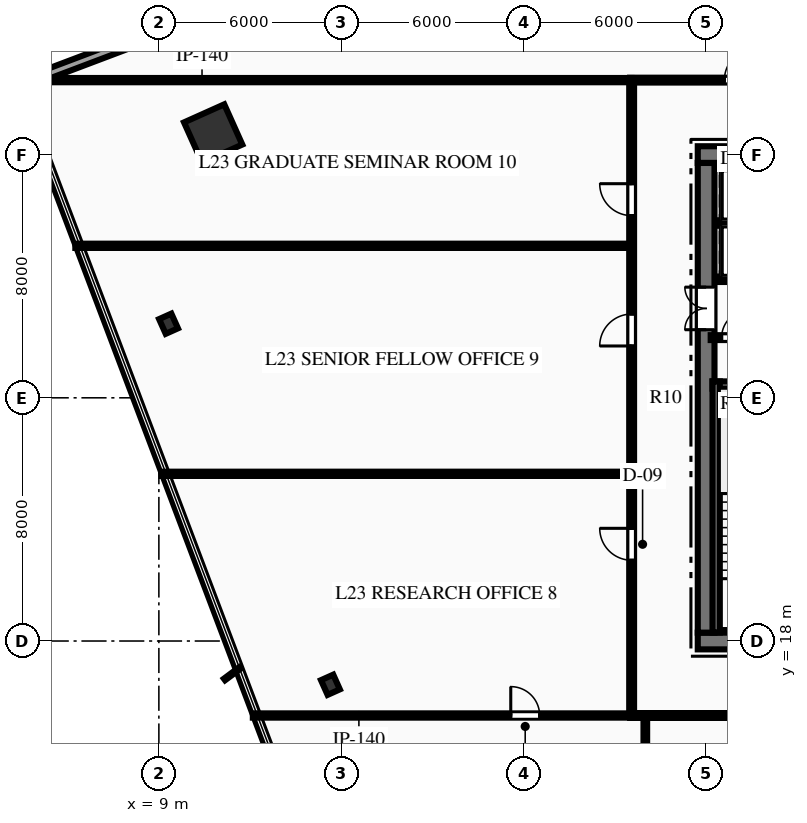
"""IFC4 building model, lengths in metres.
Left out: names, types, materials, properties, quantities, classifications, styles, units other than length and angle.
Written with IfcOpenShell. Run it as: python <this file> out.ifc"""

import sys

from ifc_helpers import new_model, si_unit, direction, frame, frame_2d, origin, origin_2d, place, context, subcontext, project, spatial, rectangle, hollow_rectangle, i_section, extrude, element, fill, save


model = new_model("IFC4")
c1 = context("Model", 3, precision=1e-05, world=origin(), true_north=direction((0.0, 1.0)))
c2 = subcontext(c1, "Body", "Model", "MODEL_VIEW")
j1 = project(units=[si_unit("LENGTHUNIT", "METRE"), si_unit("PLANEANGLEUNIT", "RADIAN")], contexts=[c1])
p1 = place(None, origin())
s1 = spatial("IfcSite", under=j1, at=p1, CompositionType="ELEMENT")
p2 = place(p1, origin())
s2 = spatial("IfcBuilding", under=s1, at=p2, CompositionType="ELEMENT")
p3 = place(p2, frame((0.0, 0.0, 97.95)))
s3 = spatial("IfcBuildingStorey", under=s2, at=p3, CompositionType="ELEMENT", Elevation=97.95)
p4 = place(p3, frame((26.725, 18.0, 0.0), z_axis=(0.0, 0.0, 1.0), x_axis=(1.0, 0.0, 0.0)))
e1 = element("IfcWall", 1, at=p4, inside=s3, PredefinedType="SHEAR", context=c2, shape_type="SweptSolid", body=[
    extrude(rectangle(XDim=18.55, YDim=0.55, at=frame_2d((9.275, 0.0))), origin(), (0.0, 0.0, 1.0), 3.75),
])
p5 = place(p4, frame((7.375, 0.0, 0.0)))
e2 = element("IfcOpeningElement", 2, at=p5, cuts=e1, PredefinedType="OPENING", context=c2, shape_type="SweptSolid", body=[
    extrude(rectangle(XDim=1.1, YDim=2.15, at=frame_2d((0.55, 1.075))), frame((0.0, 0.285, 0.0), z_axis=(0.0, -1.0, 0.0), x_axis=(1.0, 0.0, 0.0)), (0.0, 0.0, 1.0), 0.57),
])
p6 = place(p4, frame((10.075, 0.0, 0.0)))
e3 = element("IfcOpeningElement", 3, at=p6, cuts=e1, PredefinedType="OPENING", context=c2, shape_type="SweptSolid", body=[
    extrude(rectangle(XDim=1.1, YDim=2.15, at=frame_2d((0.55, 1.075))), frame((0.0, 0.285, 0.0), z_axis=(0.0, -1.0, 0.0), x_axis=(1.0, 0.0, 0.0)), (0.0, 0.0, 1.0), 0.57),
])
p7 = place(p3, frame((26.725, 34.0, 0.0), z_axis=(0.0, 0.0, 1.0), x_axis=(1.0, 0.0, 0.0)))
e4 = element("IfcWall", 4, at=p7, inside=s3, PredefinedType="SHEAR", context=c2, shape_type="SweptSolid", body=[
    extrude(rectangle(XDim=18.55, YDim=0.55, at=frame_2d((9.275, 0.0))), origin(), (0.0, 0.0, 1.0), 3.75),
])
p8 = place(p7, frame((1.24, 0.0, 0.0)))
e5 = element("IfcOpeningElement", 5, at=p8, cuts=e4, PredefinedType="OPENING", context=c2, shape_type="SweptSolid", body=[
    extrude(rectangle(XDim=1.1, YDim=2.15, at=frame_2d((0.55, 1.075))), frame((0.0, 0.285, 0.0), z_axis=(0.0, -1.0, 0.0), x_axis=(1.0, 0.0, 0.0)), (0.0, 0.0, 1.0), 0.57),
])
p9 = place(p7, frame((3.49, 0.0, 0.0)))
e6 = element("IfcOpeningElement", 6, at=p9, cuts=e4, PredefinedType="OPENING", context=c2, shape_type="SweptSolid", body=[
    extrude(rectangle(XDim=1.1, YDim=2.15, at=frame_2d((0.55, 1.075))), frame((0.0, 0.285, 0.0), z_axis=(0.0, -1.0, 0.0), x_axis=(1.0, 0.0, 0.0)), (0.0, 0.0, 1.0), 0.57),
])
p10 = place(p7, frame((13.96, 0.0, 0.0)))
e7 = element("IfcOpeningElement", 7, at=p10, cuts=e4, PredefinedType="OPENING", context=c2, shape_type="SweptSolid", body=[
    extrude(rectangle(XDim=1.1, YDim=2.15, at=frame_2d((0.55, 1.075))), frame((0.0, 0.285, 0.0), z_axis=(0.0, -1.0, 0.0), x_axis=(1.0, 0.0, 0.0)), (0.0, 0.0, 1.0), 0.57),
])
p11 = place(p7, frame((16.21, 0.0, 0.0)))
e8 = element("IfcOpeningElement", 8, at=p11, cuts=e4, PredefinedType="OPENING", context=c2, shape_type="SweptSolid", body=[
    extrude(rectangle(XDim=1.1, YDim=2.15, at=frame_2d((0.55, 1.075))), frame((0.0, 0.285, 0.0), z_axis=(0.0, -1.0, 0.0), x_axis=(1.0, 0.0, 0.0)), (0.0, 0.0, 1.0), 0.57),
])
p12 = place(p3, frame((27.0, 18.275, 0.0), z_axis=(0.0, 0.0, 1.0), x_axis=(0.0, 1.0, 0.0)))
e9 = element("IfcWall", 9, at=p12, inside=s3, PredefinedType="SHEAR", context=c2, shape_type="SweptSolid", body=[
    extrude(rectangle(XDim=15.45, YDim=0.55, at=frame_2d((7.725, 0.0))), origin(), (0.0, 0.0, 1.0), 3.75),
])
p13 = place(p12, frame((9.965, 0.0, 0.0)))
e10 = element("IfcOpeningElement", 10, at=p13, cuts=e9, PredefinedType="OPENING", context=c2, shape_type="SweptSolid", body=[
    extrude(rectangle(XDim=1.4, YDim=2.2, at=frame_2d((0.7, 1.1))), frame((0.0, 0.285, 0.0), z_axis=(0.0, -1.0, 0.0), x_axis=(1.0, 0.0, 0.0)), (0.0, 0.0, 1.0), 0.57),
])
p14 = place(p3, frame((27.21, 26.42, 0.0), z_axis=(0.0, 0.0, 1.0), x_axis=(1.0, 0.0, 0.0)))
e11 = element("IfcWall", 11, at=p14, inside=s3, PredefinedType="SHEAR", context=c2, shape_type="SweptSolid", body=[
    extrude(rectangle(XDim=3.98, YDim=0.24, at=frame_2d((1.99, 0.0))), origin(), (0.0, 0.0, 1.0), 3.75),
])
p15 = place(p3, frame((27.33, 18.28, 0.0), z_axis=(0.0, 0.0, 1.0), x_axis=(0.0, 1.0, 0.0)))
e12 = element("IfcWall", 12, at=p15, inside=s3, PredefinedType="SHEAR", context=c2, shape_type="SweptSolid", body=[
    extrude(rectangle(XDim=8.26, YDim=0.24, at=frame_2d((4.13, 0.0))), origin(), (0.0, 0.0, 1.0), 3.75),
])
p16 = place(p3, frame((10.786, 34.695, 0.0), z_axis=(0.0, 0.0, 1.0), x_axis=(0.912477494148, 0.409126902895, 0.0)))
e13 = element("IfcColumn", 13, at=p16, inside=s3, PredefinedType="COLUMN", context=c2, shape_type="SweptSolid", body=[
    extrude(hollow_rectangle(XDim=1.45, YDim=1.45, WallThickness=0.07, at=origin_2d()), origin(), (0.0, 0.0, 1.0), 3.75),
])
for number, where, z_axis, x_axis in (
    (14, (9.318, 28.437, 0.0), (0.0, 0.0, 1.0), (0.912, 0.409, 0.0)),
    (15, (14.643, 16.561, 0.0), (0.0, 0.0, 1.0), (0.912, 0.409, 0.0)),
):
    element("IfcColumn", number, at=place(p3, frame(where, z_axis=z_axis, x_axis=x_axis)), inside=s3, PredefinedType="COLUMN", context=c2, shape_type="SweptSolid", body=[
        extrude(i_section(OverallWidth=0.442, OverallDepth=0.531, WebThickness=0.066, FlangeThickness=0.106, at=origin_2d()), origin(), (0.0, 0.0, 1.0), 3.75),
    ])
p17 = place(p3, frame((4.233, 36.231, 0.0), z_axis=(0.0, 0.0, 1.0), x_axis=(0.935430530167, 0.353510570185, 0.0)))
e16 = element("IfcWall", 16, at=p17, inside=s3, PredefinedType="STANDARD", context=c2, shape_type="SweptSolid", body=[
    extrude(rectangle(XDim=4.1, YDim=0.32, at=frame_2d((2.05, 0.0))), origin(), (0.0, 0.0, 1.0), 3.45),
])
p18 = place(p3, frame((27.15, 27.98, 0.0), z_axis=(0.0, 0.0, 1.0), x_axis=(1.0, 0.0, 0.0)))
e17 = element("IfcWall", 17, at=p18, inside=s3, PredefinedType="PARTITIONING", context=c2, shape_type="SweptSolid", body=[
    extrude(rectangle(XDim=4.05, YDim=0.16, at=frame_2d((2.025, 0.0))), origin(), (0.0, 0.0, 1.0), 3.45),
])
p19 = place(p18, frame((0.36, 0.0, 0.0)))
e18 = element("IfcOpeningElement", 18, at=p19, cuts=e17, PredefinedType="OPENING", context=c2, shape_type="SweptSolid", body=[
    extrude(rectangle(XDim=0.9, YDim=2.15, at=frame_2d((0.45, 1.075))), frame((0.0, 0.09, 0.0), z_axis=(0.0, -1.0, 0.0), x_axis=(1.0, 0.0, 0.0)), (0.0, 0.0, 1.0), 0.18),
])
p20 = place(p18, frame((1.63, 0.0, 0.0)))
e19 = element("IfcOpeningElement", 19, at=p20, cuts=e17, PredefinedType="OPENING", context=c2, shape_type="SweptSolid", body=[
    extrude(rectangle(XDim=0.9, YDim=2.15, at=frame_2d((0.45, 1.075))), frame((0.0, 0.09, 0.0), z_axis=(0.0, -1.0, 0.0), x_axis=(1.0, 0.0, 0.0)), (0.0, 0.0, 1.0), 0.18),
])
p21 = place(p18, frame((2.788, 0.0, 0.0)))
e20 = element("IfcOpeningElement", 20, at=p21, cuts=e17, PredefinedType="OPENING", context=c2, shape_type="SweptSolid", body=[
    extrude(rectangle(XDim=0.9, YDim=2.15, at=frame_2d((0.45, 1.075))), frame((0.0, 0.09, 0.0), z_axis=(0.0, -1.0, 0.0), x_axis=(1.0, 0.0, 0.0)), (0.0, 0.0, 1.0), 0.18),
])
p22 = place(p3, frame((27.45, 29.9, 0.0), z_axis=(0.0, 0.0, 1.0), x_axis=(1.0, 0.0, 0.0)))
e21 = element("IfcWall", 21, at=p22, inside=s3, PredefinedType="PARTITIONING", context=c2, shape_type="SweptSolid", body=[
    extrude(rectangle(XDim=4.43, YDim=0.18, at=frame_2d((2.215, 0.0))), origin(), (0.0, 0.0, 1.0), 3.45),
])
p23 = place(p22, frame((0.515, 0.0, 0.0)))
e22 = element("IfcOpeningElement", 22, at=p23, cuts=e21, PredefinedType="OPENING", context=c2, shape_type="SweptSolid", body=[
    extrude(rectangle(XDim=1.1, YDim=2.15, at=frame_2d((0.55, 1.075))), frame((0.0, 0.1, 0.0), z_axis=(0.0, -1.0, 0.0), x_axis=(1.0, 0.0, 0.0)), (0.0, 0.0, 1.0), 0.2),
])
p24 = place(p22, frame((2.765, 0.0, 0.0)))
e23 = element("IfcOpeningElement", 23, at=p24, cuts=e21, PredefinedType="OPENING", context=c2, shape_type="SweptSolid", body=[
    extrude(rectangle(XDim=1.1, YDim=2.15, at=frame_2d((0.55, 1.075))), frame((0.0, 0.1, 0.0), z_axis=(0.0, -1.0, 0.0), x_axis=(1.0, 0.0, 0.0)), (0.0, 0.0, 1.0), 0.2),
])
p25 = place(p3, frame((27.45, 31.75, 0.0), z_axis=(0.0, 0.0, 1.0), x_axis=(1.0, 0.0, 0.0)))
e24 = element("IfcWall", 24, at=p25, inside=s3, PredefinedType="PARTITIONING", context=c2, shape_type="SweptSolid", body=[
    extrude(rectangle(XDim=4.43, YDim=0.18, at=frame_2d((2.215, 0.0))), origin(), (0.0, 0.0, 1.0), 3.45),
])
p26 = place(p3, frame((24.5, 15.55, 0.0), z_axis=(0.0, 0.0, 1.0), x_axis=(1.0, 0.0, 0.0)))
e25 = element("IfcWall", 25, at=p26, inside=s3, PredefinedType="PARTITIONING", context=c2, shape_type="SweptSolid", body=[
    extrude(rectangle(XDim=23.0, YDim=0.16, at=frame_2d((11.5, 0.0))), origin(), (0.0, 0.0, 1.0), 3.45),
])
p27 = place(p26, frame((7.725, 0.0, 0.0)))
e26 = element("IfcOpeningElement", 26, at=p27, cuts=e25, PredefinedType="OPENING", context=c2, shape_type="SweptSolid", body=[
    extrude(rectangle(XDim=1.05, YDim=2.15, at=frame_2d((0.525, 1.075))), frame((0.0, 0.09, 0.0), z_axis=(0.0, -1.0, 0.0), x_axis=(1.0, 0.0, 0.0)), (0.0, 0.0, 1.0), 0.18),
])
p28 = place(p26, frame((17.489, 0.0, 0.0)))
e27 = element("IfcOpeningElement", 27, at=p28, cuts=e25, PredefinedType="OPENING", context=c2, shape_type="SweptSolid", body=[
    extrude(rectangle(XDim=1.05, YDim=2.15, at=frame_2d((0.525, 1.075))), frame((0.0, 0.09, 0.0), z_axis=(0.0, -1.0, 0.0), x_axis=(1.0, 0.0, 0.0)), (0.0, 0.0, 1.0), 0.18),
])
p29 = place(p3, frame((24.5, 36.45, 0.0), z_axis=(0.0, 0.0, 1.0), x_axis=(1.0, 0.0, 0.0)))
e28 = element("IfcWall", 28, at=p29, inside=s3, PredefinedType="PARTITIONING", context=c2, shape_type="SweptSolid", body=[
    extrude(rectangle(XDim=23.0, YDim=0.16, at=frame_2d((11.5, 0.0))), origin(), (0.0, 0.0, 1.0), 3.45),
])
p30 = place(p29, frame((13.75, 0.0, 0.0)))
e29 = element("IfcOpeningElement", 29, at=p30, cuts=e28, PredefinedType="OPENING", context=c2, shape_type="SweptSolid", body=[
    extrude(rectangle(XDim=0.9, YDim=2.15, at=frame_2d((0.45, 1.075))), frame((0.0, 0.09, 0.0), z_axis=(0.0, -1.0, 0.0), x_axis=(1.0, 0.0, 0.0)), (0.0, 0.0, 1.0), 0.18),
])
p31 = place(p29, frame((16.05, 0.0, 0.0)))
e30 = element("IfcOpeningElement", 30, at=p31, cuts=e28, PredefinedType="OPENING", context=c2, shape_type="SweptSolid", body=[
    extrude(rectangle(XDim=0.9, YDim=2.15, at=frame_2d((0.45, 1.075))), frame((0.0, 0.09, 0.0), z_axis=(0.0, -1.0, 0.0), x_axis=(1.0, 0.0, 0.0)), (0.0, 0.0, 1.0), 0.18),
])
p32 = place(p29, frame((18.3, 0.0, 0.0)))
e31 = element("IfcOpeningElement", 31, at=p32, cuts=e28, PredefinedType="OPENING", context=c2, shape_type="SweptSolid", body=[
    extrude(rectangle(XDim=1.0, YDim=2.15, at=frame_2d((0.5, 1.075))), frame((0.0, 0.09, 0.0), z_axis=(0.0, -1.0, 0.0), x_axis=(1.0, 0.0, 0.0)), (0.0, 0.0, 1.0), 0.18),
])
p33 = place(p29, frame((3.101, 0.0, 0.0)))
e32 = element("IfcOpeningElement", 32, at=p33, cuts=e28, PredefinedType="OPENING", context=c2, shape_type="SweptSolid", body=[
    extrude(rectangle(XDim=1.05, YDim=2.15, at=frame_2d((0.525, 1.075))), frame((0.0, 0.09, 0.0), z_axis=(0.0, -1.0, 0.0), x_axis=(1.0, 0.0, 0.0)), (0.0, 0.0, 1.0), 0.18),
])
p34 = place(p29, frame((10.055, 0.0, 0.0)))
e33 = element("IfcOpeningElement", 33, at=p34, cuts=e28, PredefinedType="OPENING", context=c2, shape_type="SweptSolid", body=[
    extrude(rectangle(XDim=1.05, YDim=2.15, at=frame_2d((0.525, 1.075))), frame((0.0, 0.09, 0.0), z_axis=(0.0, -1.0, 0.0), x_axis=(1.0, 0.0, 0.0)), (0.0, 0.0, 1.0), 0.18),
])
p35 = place(p3, frame((24.55, 15.55, 0.0), z_axis=(0.0, 0.0, 1.0), x_axis=(0.0, 1.0, 0.0)))
e34 = element("IfcWall", 34, at=p35, inside=s3, PredefinedType="PARTITIONING", context=c2, shape_type="SweptSolid", body=[
    extrude(rectangle(XDim=20.9, YDim=0.16, at=frame_2d((10.45, 0.0))), origin(), (0.0, 0.0, 1.0), 3.45),
])
p36 = place(p35, frame((5.107, 0.0, 0.0)))
e35 = element("IfcOpeningElement", 35, at=p36, cuts=e34, PredefinedType="OPENING", context=c2, shape_type="SweptSolid", body=[
    extrude(rectangle(XDim=1.05, YDim=2.15, at=frame_2d((0.525, 1.075))), frame((0.0, 0.09, 0.0), z_axis=(0.0, -1.0, 0.0), x_axis=(1.0, 0.0, 0.0)), (0.0, 0.0, 1.0), 0.18),
])
p37 = place(p35, frame((12.155, 0.0, 0.0)))
e36 = element("IfcOpeningElement", 36, at=p37, cuts=e34, PredefinedType="OPENING", context=c2, shape_type="SweptSolid", body=[
    extrude(rectangle(XDim=1.05, YDim=2.15, at=frame_2d((0.525, 1.075))), frame((0.0, 0.09, 0.0), z_axis=(0.0, -1.0, 0.0), x_axis=(1.0, 0.0, 0.0)), (0.0, 0.0, 1.0), 0.18),
])
p38 = place(p35, frame((16.443, 0.0, 0.0)))
e37 = element("IfcOpeningElement", 37, at=p38, cuts=e34, PredefinedType="OPENING", context=c2, shape_type="SweptSolid", body=[
    extrude(rectangle(XDim=1.05, YDim=2.15, at=frame_2d((0.525, 1.075))), frame((0.0, 0.09, 0.0), z_axis=(0.0, -1.0, 0.0), x_axis=(1.0, 0.0, 0.0)), (0.0, 0.0, 1.0), 0.18),
])
p39 = place(p3, frame((12.09, 15.55, 0.0), z_axis=(0.0, 0.0, 1.0), x_axis=(1.0, 0.0, 0.0)))
e38 = element("IfcWall", 38, at=p39, inside=s3, PredefinedType="PARTITIONING", context=c2, shape_type="SweptSolid", body=[
    extrude(rectangle(XDim=12.46, YDim=0.14, at=frame_2d((6.23, 0.0))), origin(), (0.0, 0.0, 1.0), 3.45),
])
p40 = place(p39, frame((8.484, 0.0, 0.0)))
e39 = element("IfcOpeningElement", 39, at=p40, cuts=e38, PredefinedType="OPENING", context=c2, shape_type="SweptSolid", body=[
    extrude(rectangle(XDim=0.95, YDim=2.15, at=frame_2d((0.475, 1.075))), frame((0.0, 0.08, 0.0), z_axis=(0.0, -1.0, 0.0), x_axis=(1.0, 0.0, 0.0)), (0.0, 0.0, 1.0), 0.16),
])
p41 = place(p3, frame((4.924, 36.45, 0.0), z_axis=(0.0, 0.0, 1.0), x_axis=(1.0, 0.0, 0.0)))
e40 = element("IfcWall", 40, at=p41, inside=s3, PredefinedType="PARTITIONING", context=c2, shape_type="SweptSolid", body=[
    extrude(rectangle(XDim=19.626, YDim=0.14, at=frame_2d((9.813, 0.0))), origin(), (0.0, 0.0, 1.0), 3.45),
])
p42 = place(p3, frame((25.0, -4.305, 0.0), z_axis=(0.0, 0.0, 1.0), x_axis=(0.0, 1.0, 0.0)))
e41 = element("IfcWall", 41, at=p42, inside=s3, PredefinedType="PARTITIONING", context=c2, shape_type="SweptSolid", body=[
    extrude(rectangle(XDim=19.855, YDim=0.12, at=frame_2d((9.927, 0.0))), origin(), (0.0, 0.0, 1.0), 3.45),
])
p43 = place(p3, frame((9.086, 23.5, 0.0), z_axis=(0.0, 0.0, 1.0), x_axis=(1.0, 0.0, 0.0)))
e42 = element("IfcWall", 42, at=p43, inside=s3, PredefinedType="PARTITIONING", context=c2, shape_type="SweptSolid", body=[
    extrude(rectangle(XDim=15.464, YDim=0.14, at=frame_2d((7.732, 0.0))), origin(), (0.0, 0.0, 1.0), 3.45),
])
p44 = place(p3, frame((6.252, 31.0, 0.0), z_axis=(0.0, 0.0, 1.0), x_axis=(1.0, 0.0, 0.0)))
e43 = element("IfcWall", 43, at=p44, inside=s3, PredefinedType="PARTITIONING", context=c2, shape_type="SweptSolid", body=[
    extrude(rectangle(XDim=18.298, YDim=0.14, at=frame_2d((9.149, 0.0))), origin(), (0.0, 0.0, 1.0), 3.45),
])
p45 = place(p19, origin())
e44 = element("IfcDoor", 44, at=p45, inside=s3, OperationType="SINGLE_SWING_RIGHT", PredefinedType="DOOR", context=c2, shape_type="SweptSolid", body=[
    extrude(rectangle(XDim=0.9, YDim=2.15, at=frame_2d((0.45, 1.075))), frame((0.0, 0.025, 0.0), z_axis=(0.0, -1.0, 0.0), x_axis=(1.0, 0.0, 0.0)), (0.0, 0.0, 1.0), 0.05),
])
fill(e18, e44)
p46 = place(p13, origin())
e45 = element("IfcDoor", 45, at=p46, inside=s3, OperationType="DOUBLE_DOOR_SINGLE_SWING", PredefinedType="DOOR", context=c2, shape_type="SweptSolid", body=[
    extrude(rectangle(XDim=1.4, YDim=2.2, at=frame_2d((0.7, 1.1))), frame((0.0, 0.025, 0.0), z_axis=(0.0, -1.0, 0.0), x_axis=(1.0, 0.0, 0.0)), (0.0, 0.0, 1.0), 0.05),
])
fill(e10, e45)
p47 = place(p40, origin())
e46 = element("IfcDoor", 46, at=p47, inside=s3, OperationType="SINGLE_SWING_LEFT", PredefinedType="DOOR", context=c2, shape_type="SweptSolid", body=[
    extrude(rectangle(XDim=0.95, YDim=2.15, at=frame_2d((0.475, 1.075))), frame((0.0, 0.025, 0.0), z_axis=(0.0, -1.0, 0.0), x_axis=(1.0, 0.0, 0.0)), (0.0, 0.0, 1.0), 0.05),
])
fill(e39, e46)
p48 = place(p33, origin())
e47 = element("IfcDoor", 47, at=p48, inside=s3, OperationType="SINGLE_SWING_RIGHT", PredefinedType="DOOR", context=c2, shape_type="SweptSolid", body=[
    extrude(rectangle(XDim=1.05, YDim=2.15, at=frame_2d((0.525, 1.075))), frame((0.0, 0.025, 0.0), z_axis=(0.0, -1.0, 0.0), x_axis=(1.0, 0.0, 0.0)), (0.0, 0.0, 1.0), 0.05),
])
fill(e32, e47)
p49 = place(p36, origin())
e48 = element("IfcDoor", 48, at=p49, inside=s3, OperationType="SINGLE_SWING_RIGHT", PredefinedType="DOOR", context=c2, shape_type="SweptSolid", body=[
    extrude(rectangle(XDim=1.05, YDim=2.15, at=frame_2d((0.525, 1.075))), frame((0.0, 0.025, 0.0), z_axis=(0.0, -1.0, 0.0), x_axis=(1.0, 0.0, 0.0)), (0.0, 0.0, 1.0), 0.05),
])
fill(e35, e48)
p50 = place(p37, origin())
e49 = element("IfcDoor", 49, at=p50, inside=s3, OperationType="SINGLE_SWING_LEFT", PredefinedType="DOOR", context=c2, shape_type="SweptSolid", body=[
    extrude(rectangle(XDim=1.05, YDim=2.15, at=frame_2d((0.525, 1.075))), frame((0.0, 0.025, 0.0), z_axis=(0.0, -1.0, 0.0), x_axis=(1.0, 0.0, 0.0)), (0.0, 0.0, 1.0), 0.05),
])
fill(e36, e49)
p51 = place(p38, origin())
e50 = element("IfcDoor", 50, at=p51, inside=s3, OperationType="SINGLE_SWING_RIGHT", PredefinedType="DOOR", context=c2, shape_type="SweptSolid", body=[
    extrude(rectangle(XDim=1.05, YDim=2.15, at=frame_2d((0.525, 1.075))), frame((0.0, 0.025, 0.0), z_axis=(0.0, -1.0, 0.0), x_axis=(1.0, 0.0, 0.0)), (0.0, 0.0, 1.0), 0.05),
])
fill(e37, e50)
save(model, sys.argv[1])
